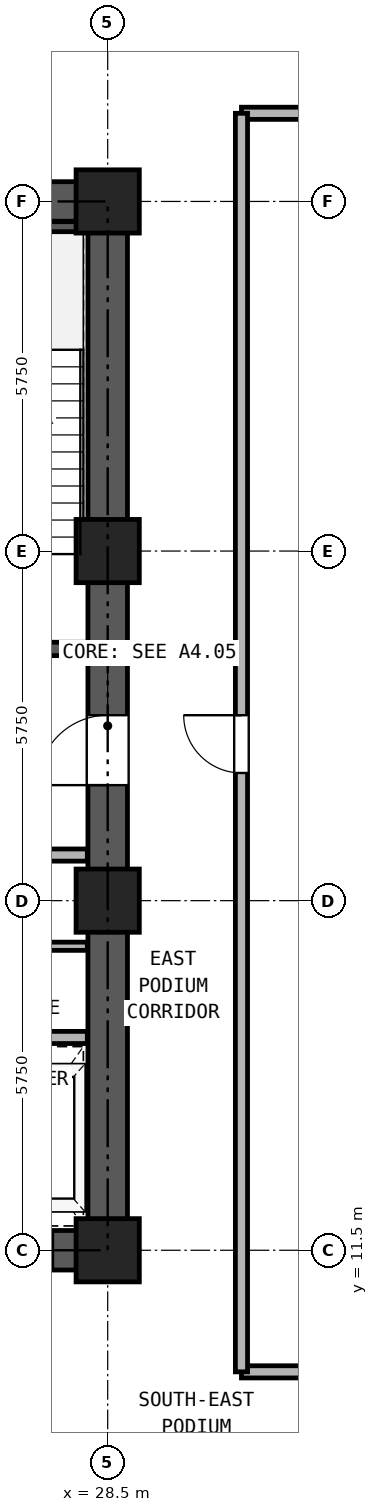
"""IFC4 building model, lengths in metres.
Left out: names, types, materials, properties, quantities, classifications, styles, units other than length and angle.
Written with IfcOpenShell. Run it as: python <this file> out.ifc"""

import sys

from ifc_helpers import new_model, si_unit, direction, frame, frame_2d, origin, origin_2d, place, context, subcontext, project, spatial, rectangle, hollow_rectangle, extrude, source, transform, mapped, element, fill, save


model = new_model("IFC4")
c1 = context("Model", 3, precision=1e-05, world=origin(), true_north=direction((0.0, 1.0)))
c2 = subcontext(c1, "Body", "Model", "MODEL_VIEW")
j1 = project(units=[si_unit("LENGTHUNIT", "METRE"), si_unit("PLANEANGLEUNIT", "RADIAN")], contexts=[c1])
p1 = place(None, origin())
s1 = spatial("IfcSite", under=j1, at=p1, CompositionType="ELEMENT")
p2 = place(p1, origin())
s2 = spatial("IfcBuilding", under=s1, at=p2, CompositionType="ELEMENT")
p3 = place(p2, frame((0.0, 0.0, 18.0)))
s3 = spatial("IfcBuildingStorey", under=s2, at=p3, CompositionType="ELEMENT", Elevation=18.0)
m1 = source(origin(), c2, "Body", "SweptSolid", [
    extrude(hollow_rectangle(XDim=1.04, YDim=1.04, WallThickness=0.065, at=origin_2d()), origin(), (0.0, 0.0, 1.0), 4.14),
])
for number, where, z_axis, x_axis in (
    (1, (28.5, 11.5, 0.0), (0.0, 0.0, 1.0), (1.0, 0.0, 0.0)),
    (2, (28.5, 17.25, 0.0), (0.0, 0.0, 1.0), (1.0, 0.0, 0.0)),
    (3, (28.5, 23.0, 0.0), (0.0, 0.0, 1.0), (1.0, 0.0, 0.0)),
    (4, (28.5, 28.75, 0.0), (0.0, 0.0, 1.0), (1.0, 0.0, 0.0)),
):
    element("IfcColumn", number, at=place(p3, frame(where, z_axis=z_axis, x_axis=x_axis)), inside=s3, PredefinedType="COLUMN", context=c2, shape_type="MappedRepresentation", body=[
        mapped(m1, transform((0.0, 0.0, 0.0), x_axis=(1.0, 0.0, 0.0), y_axis=(0.0, 1.0, 0.0), z_axis=(0.0, 0.0, 1.0), scale=1.0)),
    ])
p4 = place(p3, frame((18.175, 11.5, 0.0), z_axis=(0.0, 0.0, 1.0), x_axis=(1.0, 0.0, 0.0)))
e5 = element("IfcWall", 5, at=p4, inside=s3, PredefinedType="SHEAR", context=c2, shape_type="SweptSolid", body=[
    extrude(rectangle(XDim=10.65, YDim=0.65, at=frame_2d((5.325, 0.0))), origin(), (0.0, 0.0, 1.0), 4.14),
])
p5 = place(p4, frame((1.195, 0.0, 0.0)))
e6 = element("IfcOpeningElement", 6, at=p5, cuts=e5, PredefinedType="OPENING", context=c2, shape_type="SweptSolid", body=[
    extrude(rectangle(XDim=1.1, YDim=2.25, at=frame_2d((0.55, 1.125))), frame((0.0, 0.335, 0.0), z_axis=(0.0, -1.0, 0.0), x_axis=(1.0, 0.0, 0.0)), (0.0, 0.0, 1.0), 0.67),
])
p6 = place(p4, frame((3.495, 0.0, 0.0)))
e7 = element("IfcOpeningElement", 7, at=p6, cuts=e5, PredefinedType="OPENING", context=c2, shape_type="SweptSolid", body=[
    extrude(rectangle(XDim=1.1, YDim=2.25, at=frame_2d((0.55, 1.125))), frame((0.0, 0.335, 0.0), z_axis=(0.0, -1.0, 0.0), x_axis=(1.0, 0.0, 0.0)), (0.0, 0.0, 1.0), 0.67),
])
p7 = place(p4, frame((5.925, 0.0, 0.0)))
e8 = element("IfcOpeningElement", 8, at=p7, cuts=e5, PredefinedType="OPENING", context=c2, shape_type="SweptSolid", body=[
    extrude(rectangle(XDim=1.1, YDim=2.25, at=frame_2d((0.55, 1.125))), frame((0.0, 0.335, 0.0), z_axis=(0.0, -1.0, 0.0), x_axis=(1.0, 0.0, 0.0)), (0.0, 0.0, 1.0), 0.67),
])
p8 = place(p4, frame((8.325, 0.0, 0.0)))
e9 = element("IfcOpeningElement", 9, at=p8, cuts=e5, PredefinedType="OPENING", context=c2, shape_type="SweptSolid", body=[
    extrude(rectangle(XDim=1.1, YDim=2.25, at=frame_2d((0.55, 1.125))), frame((0.0, 0.335, 0.0), z_axis=(0.0, -1.0, 0.0), x_axis=(1.0, 0.0, 0.0)), (0.0, 0.0, 1.0), 0.67),
])
p9 = place(p3, frame((18.175, 28.75, 0.0), z_axis=(0.0, 0.0, 1.0), x_axis=(1.0, 0.0, 0.0)))
e10 = element("IfcWall", 10, at=p9, inside=s3, PredefinedType="SHEAR", context=c2, shape_type="SweptSolid", body=[
    extrude(rectangle(XDim=10.65, YDim=0.65, at=frame_2d((5.325, 0.0))), origin(), (0.0, 0.0, 1.0), 4.14),
])
p10 = place(p9, frame((4.205, 0.0, 0.0)))
e11 = element("IfcOpeningElement", 11, at=p10, cuts=e10, PredefinedType="OPENING", context=c2, shape_type="SweptSolid", body=[
    extrude(rectangle(XDim=0.9, YDim=2.05, at=frame_2d((0.45, 1.025))), frame((0.0, 0.335, 0.0), z_axis=(0.0, -1.0, 0.0), x_axis=(1.0, 0.0, 0.0)), (0.0, 0.0, 1.0), 0.67),
])
p11 = place(p9, frame((5.745, 0.0, 0.0)))
e12 = element("IfcOpeningElement", 12, at=p11, cuts=e10, PredefinedType="OPENING", context=c2, shape_type="SweptSolid", body=[
    extrude(rectangle(XDim=0.9, YDim=2.05, at=frame_2d((0.45, 1.025))), frame((0.0, 0.335, 0.0), z_axis=(0.0, -1.0, 0.0), x_axis=(1.0, 0.0, 0.0)), (0.0, 0.0, 1.0), 0.67),
])
p12 = place(p3, frame((28.5, 11.825, 0.0), z_axis=(0.0, 0.0, 1.0), x_axis=(0.0, 1.0, 0.0)))
e13 = element("IfcWall", 13, at=p12, inside=s3, PredefinedType="SHEAR", context=c2, shape_type="SweptSolid", body=[
    extrude(rectangle(XDim=16.6, YDim=0.65, at=frame_2d((8.3, 0.0))), origin(), (0.0, 0.0, 1.0), 4.14),
])
p13 = place(p12, frame((7.325, 0.0, 0.0)))
e14 = element("IfcOpeningElement", 14, at=p13, cuts=e13, PredefinedType="OPENING", context=c2, shape_type="SweptSolid", body=[
    extrude(rectangle(XDim=1.15, YDim=2.2, at=frame_2d((0.575, 1.1))), frame((0.0, 0.335, 0.0), z_axis=(0.0, -1.0, 0.0), x_axis=(1.0, 0.0, 0.0)), (0.0, 0.0, 1.0), 0.67),
])
p14 = place(p3, frame((25.13, 28.335, 0.0), z_axis=(0.0, 0.0, 1.0), x_axis=(1.0, 0.0, 0.0)))
e15 = element("IfcWall", 15, at=p14, inside=s3, PredefinedType="PARTITIONING", context=c2, shape_type="SweptSolid", body=[
    extrude(rectangle(XDim=3.035, YDim=0.165, at=frame_2d((1.518, 0.0))), origin(), (0.0, 0.0, 1.0), 4.14),
])
p15 = place(p3, frame((25.13, 21.39, 0.0), z_axis=(0.0, 0.0, 1.0), x_axis=(1.0, 0.0, 0.0)))
e16 = element("IfcWall", 16, at=p15, inside=s3, PredefinedType="SOLIDWALL", context=c2, shape_type="SweptSolid", body=[
    extrude(rectangle(XDim=3.035, YDim=0.22, at=frame_2d((1.518, 0.0))), origin(), (0.0, 0.0, 1.0), 4.14),
])
p16 = place(p15, frame((0.92, 0.0, 0.0)))
e17 = element("IfcOpeningElement", 17, at=p16, cuts=e16, PredefinedType="OPENING", context=c2, shape_type="SweptSolid", body=[
    extrude(rectangle(XDim=1.15, YDim=2.2, at=frame_2d((0.575, 1.1))), frame((0.0, 0.12, 0.0), z_axis=(0.0, -1.0, 0.0), x_axis=(1.0, 0.0, 0.0)), (0.0, 0.0, 1.0), 0.24),
])
p17 = place(p3, frame((18.835, 18.0, 0.0), z_axis=(0.0, 0.0, 1.0), x_axis=(1.0, 0.0, 0.0)))
e18 = element("IfcWall", 18, at=p17, inside=s3, PredefinedType="PARTITIONING", context=c2, shape_type="SweptSolid", body=[
    extrude(rectangle(XDim=9.33, YDim=0.2, at=frame_2d((4.665, 0.0))), origin(), (0.0, 0.0, 1.0), 4.14),
])
p18 = place(p17, frame((0.415, 0.0, 0.0)))
e19 = element("IfcOpeningElement", 19, at=p18, cuts=e18, PredefinedType="OPENING", context=c2, shape_type="SweptSolid", body=[
    extrude(rectangle(XDim=1.3, YDim=2.3, at=frame_2d((0.65, 1.15))), frame((0.0, 0.11, 0.0), z_axis=(0.0, -1.0, 0.0), x_axis=(1.0, 0.0, 0.0)), (0.0, 0.0, 1.0), 0.22),
])
p19 = place(p17, frame((2.515, 0.0, 0.0)))
e20 = element("IfcOpeningElement", 20, at=p19, cuts=e18, PredefinedType="OPENING", context=c2, shape_type="SweptSolid", body=[
    extrude(rectangle(XDim=1.3, YDim=2.3, at=frame_2d((0.65, 1.15))), frame((0.0, 0.11, 0.0), z_axis=(0.0, -1.0, 0.0), x_axis=(1.0, 0.0, 0.0)), (0.0, 0.0, 1.0), 0.22),
])
p20 = place(p17, frame((7.015, 0.0, 0.0)))
e21 = element("IfcOpeningElement", 21, at=p20, cuts=e18, PredefinedType="OPENING", context=c2, shape_type="SweptSolid", body=[
    extrude(rectangle(XDim=1.0, YDim=2.15, at=frame_2d((0.5, 1.075))), frame((0.0, 0.11, 0.0), z_axis=(0.0, -1.0, 0.0), x_axis=(1.0, 0.0, 0.0)), (0.0, 0.0, 1.0), 0.22),
])
p21 = place(p3, frame((18.835, 15.0, 0.0), z_axis=(0.0, 0.0, 1.0), x_axis=(1.0, 0.0, 0.0)))
e22 = element("IfcWall", 22, at=p21, inside=s3, PredefinedType="PARTITIONING", context=c2, shape_type="SweptSolid", body=[
    extrude(rectangle(XDim=9.33, YDim=0.2, at=frame_2d((4.665, 0.0))), origin(), (0.0, 0.0, 1.0), 4.14),
])
p22 = place(p3, frame((23.3, 16.5, 0.0), z_axis=(0.0, 0.0, 1.0), x_axis=(1.0, 0.0, 0.0)))
e23 = element("IfcWall", 23, at=p22, inside=s3, PredefinedType="PARTITIONING", context=c2, shape_type="SweptSolid", body=[
    extrude(rectangle(XDim=4.865, YDim=0.135, at=frame_2d((2.433, 0.0))), origin(), (0.0, 0.0, 1.0), 4.14),
])
p23 = place(p22, frame((2.55, 0.0, 0.0)))
e24 = element("IfcOpeningElement", 24, at=p23, cuts=e23, PredefinedType="OPENING", context=c2, shape_type="SweptSolid", body=[
    extrude(rectangle(XDim=0.9, YDim=2.05, at=frame_2d((0.45, 1.025))), frame((0.0, 0.077, 0.0), z_axis=(0.0, -1.0, 0.0), x_axis=(1.0, 0.0, 0.0)), (0.0, 0.0, 1.0), 0.155),
])
for number, where, z_axis, x_axis in (
    (25, (30.7, 9.5, 0.0), (0.0, 0.0, 1.0), (1.0, 0.0, 0.0)),
    (26, (30.7, 30.2, 0.0), (0.0, 0.0, 1.0), (1.0, 0.0, 0.0)),
):
    element("IfcWall", number, at=place(p3, frame(where, z_axis=z_axis, x_axis=x_axis)), inside=s3, PredefinedType="PARTITIONING", context=c2, shape_type="SweptSolid", body=[
        extrude(rectangle(XDim=5.8, YDim=0.2, at=frame_2d((2.9, 0.0))), origin(), (0.0, 0.0, 1.0), 4.14),
    ])
p24 = place(p3, frame((30.7, 9.5, 0.0), z_axis=(0.0, 0.0, 1.0), x_axis=(0.0, 1.0, 0.0)))
e27 = element("IfcWall", 27, at=p24, inside=s3, PredefinedType="PARTITIONING", context=c2, shape_type="SweptSolid", body=[
    extrude(rectangle(XDim=20.7, YDim=0.2, at=frame_2d((10.35, 0.0))), origin(), (0.0, 0.0, 1.0), 4.14),
])
p25 = place(p24, frame((9.85, 0.0, 0.0)))
e28 = element("IfcOpeningElement", 28, at=p25, cuts=e27, PredefinedType="OPENING", context=c2, shape_type="SweptSolid", body=[
    extrude(rectangle(XDim=0.95, YDim=2.15, at=frame_2d((0.475, 1.075))), frame((0.0, 0.11, 0.0), z_axis=(0.0, -1.0, 0.0), x_axis=(1.0, 0.0, 0.0)), (0.0, 0.0, 1.0), 0.22),
])
p26 = place(p13, origin())
e29 = element("IfcDoor", 29, at=p26, inside=s3, OperationType="SINGLE_SWING_LEFT", PredefinedType="DOOR", context=c2, shape_type="SweptSolid", body=[
    extrude(rectangle(XDim=1.15, YDim=2.2, at=frame_2d((0.575, 1.1))), frame((0.0, 0.025, 0.0), z_axis=(0.0, -1.0, 0.0), x_axis=(1.0, 0.0, 0.0)), (0.0, 0.0, 1.0), 0.05),
])
fill(e14, e29)
p27 = place(p8, frame((1.1, 0.0, 0.0), z_axis=(0.0, 0.0, 1.0), x_axis=(-1.0, 0.0, 0.0)))
e30 = element("IfcDoor", 30, at=p27, inside=s3, OperationType="DOUBLE_DOOR_SLIDING", PredefinedType="DOOR", context=c2, shape_type="SweptSolid", body=[
    extrude(rectangle(XDim=1.1, YDim=2.25, at=frame_2d((0.55, 1.125))), frame((0.0, 0.025, 0.0), z_axis=(0.0, -1.0, 0.0), x_axis=(1.0, 0.0, 0.0)), (0.0, 0.0, 1.0), 0.05),
])
fill(e9, e30)
p28 = place(p25, origin())
e31 = element("IfcDoor", 31, at=p28, inside=s3, OperationType="SINGLE_SWING_RIGHT", PredefinedType="DOOR", context=c2, shape_type="SweptSolid", body=[
    extrude(rectangle(XDim=0.95, YDim=2.15, at=frame_2d((0.475, 1.075))), frame((0.0, 0.025, 0.0), z_axis=(0.0, -1.0, 0.0), x_axis=(1.0, 0.0, 0.0)), (0.0, 0.0, 1.0), 0.05),
])
fill(e28, e31)
save(model, sys.argv[1])
